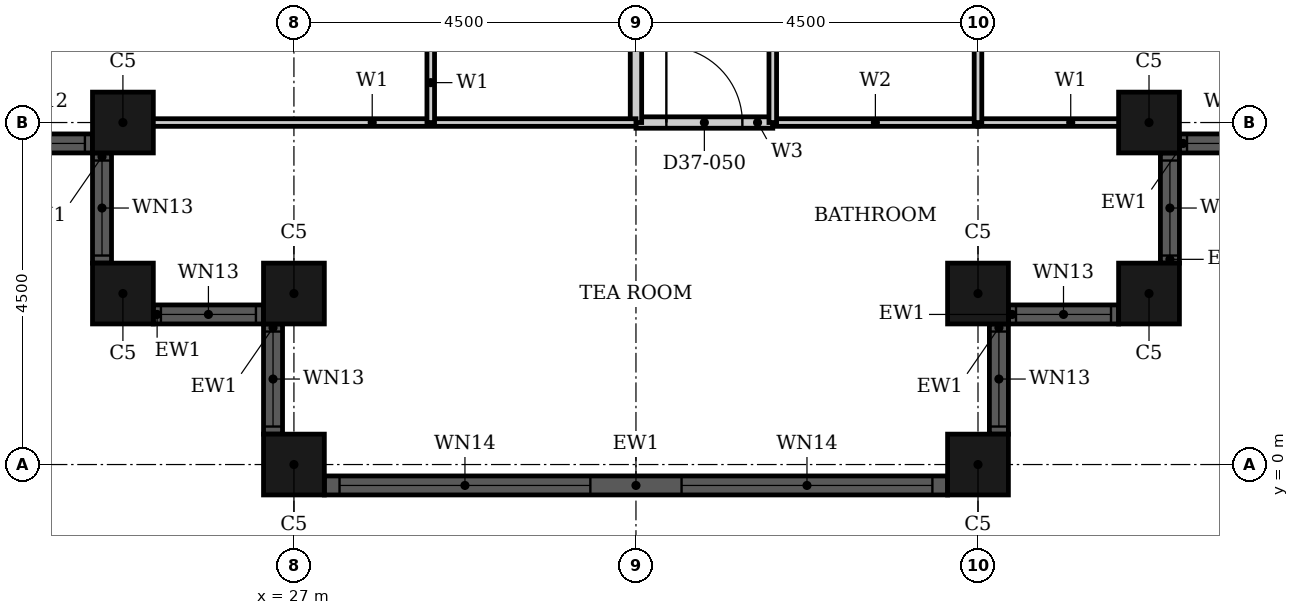
"""IFC4 building model, lengths in metres.
Left out: names, types, materials, properties, quantities, classifications, styles, units other than length and angle.
Written with IfcOpenShell. Run it as: python <this file> out.ifc"""

import sys

from ifc_helpers import new_model, si_unit, direction, frame, frame_2d, origin, origin_2d, place, context, subcontext, project, spatial, rectangle, hollow_rectangle, extrude, element, fill, save


model = new_model("IFC4")
c1 = context("Model", 3, precision=1e-05, world=origin(), true_north=direction((0.0, 1.0)))
c2 = subcontext(c1, "Body", "Model", "MODEL_VIEW")
j1 = project(units=[si_unit("LENGTHUNIT", "METRE"), si_unit("PLANEANGLEUNIT", "RADIAN")], contexts=[c1])
p1 = place(None, origin())
s1 = spatial("IfcSite", under=j1, at=p1, CompositionType="ELEMENT")
p2 = place(p1, origin())
s2 = spatial("IfcBuilding", under=s1, at=p2, CompositionType="ELEMENT")
p3 = place(p2, frame((0.0, 0.0, 150.6)))
s3 = spatial("IfcBuildingStorey", under=s2, at=p3, CompositionType="ELEMENT", Elevation=150.6)
for number, where, z_axis, x_axis in (
    (1, (24.75, 4.5, 0.0), (0.0, 0.0, 1.0), (1.0, 0.0, 0.0)),
    (2, (24.75, 2.25, 0.0), (0.0, 0.0, 1.0), (1.0, 0.0, 0.0)),
    (3, (27.0, 2.25, 0.0), (0.0, 0.0, 1.0), (1.0, 0.0, 0.0)),
    (4, (27.0, 0.0, 0.0), (0.0, 0.0, 1.0), (1.0, 0.0, 0.0)),
    (5, (36.0, 0.0, 0.0), (0.0, 0.0, 1.0), (1.0, 0.0, 0.0)),
    (6, (36.0, 2.25, 0.0), (0.0, 0.0, 1.0), (1.0, 0.0, 0.0)),
    (7, (38.25, 2.25, 0.0), (0.0, 0.0, 1.0), (1.0, 0.0, 0.0)),
    (8, (38.25, 4.5, 0.0), (0.0, 0.0, 1.0), (1.0, 0.0, 0.0)),
):
    element("IfcColumn", number, at=place(p3, frame(where, z_axis=z_axis, x_axis=x_axis)), inside=s3, PredefinedType="COLUMN", context=c2, shape_type="SweptSolid", body=[
        extrude(hollow_rectangle(XDim=0.8, YDim=0.8, WallThickness=0.025, at=origin_2d()), origin(), (0.0, 0.0, 1.0), 3.7),
    ])
p4 = place(p3, frame((22.9, 4.225, 0.0), z_axis=(0.0, 0.0, 1.0), x_axis=(1.0, 0.0, 0.0)))
e9 = element("IfcWall", 9, at=p4, inside=s3, PredefinedType="SOLIDWALL", context=c2, shape_type="SweptSolid", body=[
    extrude(rectangle(XDim=1.45, YDim=0.25, at=frame_2d((0.725, 0.0))), origin(), (0.0, 0.0, 1.0), 3.7),
])
p5 = place(p4, frame((0.1, 0.0, 0.9)))
e10 = element("IfcOpeningElement", 10, at=p5, cuts=e9, PredefinedType="OPENING", context=c2, shape_type="SweptSolid", body=[
    extrude(rectangle(XDim=1.25, YDim=2.08, at=frame_2d((0.625, 1.04))), frame((0.0, 0.135, 0.0), z_axis=(0.0, -1.0, 0.0), x_axis=(1.0, 0.0, 0.0)), (0.0, 0.0, 1.0), 0.27),
])
p6 = place(p3, frame((24.475, 4.1, 0.0), z_axis=(0.0, 0.0, 1.0), x_axis=(0.0, -1.0, 0.0)))
e11 = element("IfcWall", 11, at=p6, inside=s3, PredefinedType="SOLIDWALL", context=c2, shape_type="SweptSolid", body=[
    extrude(rectangle(XDim=1.45, YDim=0.25, at=frame_2d((0.725, 0.0))), origin(), (0.0, 0.0, 1.0), 3.7),
])
p7 = place(p6, frame((0.1, 0.0, 0.9)))
e12 = element("IfcOpeningElement", 12, at=p7, cuts=e11, PredefinedType="OPENING", context=c2, shape_type="SweptSolid", body=[
    extrude(rectangle(XDim=1.25, YDim=1.85, at=frame_2d((0.625, 0.925))), frame((0.0, 0.135, 0.0), z_axis=(0.0, -1.0, 0.0), x_axis=(1.0, 0.0, 0.0)), (0.0, 0.0, 1.0), 0.27),
])
p8 = place(p3, frame((25.15, 1.975, 0.0), z_axis=(0.0, 0.0, 1.0), x_axis=(1.0, 0.0, 0.0)))
e13 = element("IfcWall", 13, at=p8, inside=s3, PredefinedType="SOLIDWALL", context=c2, shape_type="SweptSolid", body=[
    extrude(rectangle(XDim=1.45, YDim=0.25, at=frame_2d((0.725, 0.0))), origin(), (0.0, 0.0, 1.0), 3.7),
])
p9 = place(p8, frame((0.1, 0.0, 0.9)))
e14 = element("IfcOpeningElement", 14, at=p9, cuts=e13, PredefinedType="OPENING", context=c2, shape_type="SweptSolid", body=[
    extrude(rectangle(XDim=1.25, YDim=1.85, at=frame_2d((0.625, 0.925))), frame((0.0, 0.135, 0.0), z_axis=(0.0, -1.0, 0.0), x_axis=(1.0, 0.0, 0.0)), (0.0, 0.0, 1.0), 0.27),
])
p10 = place(p3, frame((26.725, 1.85, 0.0), z_axis=(0.0, 0.0, 1.0), x_axis=(0.0, -1.0, 0.0)))
e15 = element("IfcWall", 15, at=p10, inside=s3, PredefinedType="SOLIDWALL", context=c2, shape_type="SweptSolid", body=[
    extrude(rectangle(XDim=1.45, YDim=0.25, at=frame_2d((0.725, 0.0))), origin(), (0.0, 0.0, 1.0), 3.7),
])
p11 = place(p10, frame((0.1, 0.0, 0.9)))
e16 = element("IfcOpeningElement", 16, at=p11, cuts=e15, PredefinedType="OPENING", context=c2, shape_type="SweptSolid", body=[
    extrude(rectangle(XDim=1.25, YDim=1.85, at=frame_2d((0.625, 0.925))), frame((0.0, 0.135, 0.0), z_axis=(0.0, -1.0, 0.0), x_axis=(1.0, 0.0, 0.0)), (0.0, 0.0, 1.0), 0.27),
])
p12 = place(p3, frame((27.4, -0.275, 0.0), z_axis=(0.0, 0.0, 1.0), x_axis=(1.0, 0.0, 0.0)))
e17 = element("IfcWall", 17, at=p12, inside=s3, PredefinedType="SOLIDWALL", context=c2, shape_type="SweptSolid", body=[
    extrude(rectangle(XDim=8.2, YDim=0.25, at=frame_2d((4.1, 0.0))), origin(), (0.0, 0.0, 1.0), 3.7),
])
p13 = place(p12, frame((0.2, 0.0, 0.45)))
e18 = element("IfcOpeningElement", 18, at=p13, cuts=e17, PredefinedType="OPENING", context=c2, shape_type="SweptSolid", body=[
    extrude(rectangle(XDim=3.3, YDim=2.53, at=frame_2d((1.65, 1.265))), frame((0.0, 0.135, 0.0), z_axis=(0.0, -1.0, 0.0), x_axis=(1.0, 0.0, 0.0)), (0.0, 0.0, 1.0), 0.27),
])
p14 = place(p12, frame((4.7, 0.0, 0.45)))
e19 = element("IfcOpeningElement", 19, at=p14, cuts=e17, PredefinedType="OPENING", context=c2, shape_type="SweptSolid", body=[
    extrude(rectangle(XDim=3.3, YDim=2.53, at=frame_2d((1.65, 1.265))), frame((0.0, 0.135, 0.0), z_axis=(0.0, -1.0, 0.0), x_axis=(1.0, 0.0, 0.0)), (0.0, 0.0, 1.0), 0.27),
])
p15 = place(p3, frame((36.275, 0.4, 0.0), z_axis=(0.0, 0.0, 1.0), x_axis=(0.0, 1.0, 0.0)))
e20 = element("IfcWall", 20, at=p15, inside=s3, PredefinedType="SOLIDWALL", context=c2, shape_type="SweptSolid", body=[
    extrude(rectangle(XDim=1.45, YDim=0.25, at=frame_2d((0.725, 0.0))), origin(), (0.0, 0.0, 1.0), 3.7),
])
p16 = place(p15, frame((0.1, 0.0, 0.9)))
e21 = element("IfcOpeningElement", 21, at=p16, cuts=e20, PredefinedType="OPENING", context=c2, shape_type="SweptSolid", body=[
    extrude(rectangle(XDim=1.25, YDim=1.85, at=frame_2d((0.625, 0.925))), frame((0.0, 0.135, 0.0), z_axis=(0.0, -1.0, 0.0), x_axis=(1.0, 0.0, 0.0)), (0.0, 0.0, 1.0), 0.27),
])
p17 = place(p3, frame((36.4, 1.975, 0.0), z_axis=(0.0, 0.0, 1.0), x_axis=(1.0, 0.0, 0.0)))
e22 = element("IfcWall", 22, at=p17, inside=s3, PredefinedType="SOLIDWALL", context=c2, shape_type="SweptSolid", body=[
    extrude(rectangle(XDim=1.45, YDim=0.25, at=frame_2d((0.725, 0.0))), origin(), (0.0, 0.0, 1.0), 3.7),
])
p18 = place(p17, frame((0.1, 0.0, 0.9)))
e23 = element("IfcOpeningElement", 23, at=p18, cuts=e22, PredefinedType="OPENING", context=c2, shape_type="SweptSolid", body=[
    extrude(rectangle(XDim=1.25, YDim=1.85, at=frame_2d((0.625, 0.925))), frame((0.0, 0.135, 0.0), z_axis=(0.0, -1.0, 0.0), x_axis=(1.0, 0.0, 0.0)), (0.0, 0.0, 1.0), 0.27),
])
p19 = place(p3, frame((38.525, 2.65, 0.0), z_axis=(0.0, 0.0, 1.0), x_axis=(0.0, 1.0, 0.0)))
e24 = element("IfcWall", 24, at=p19, inside=s3, PredefinedType="SOLIDWALL", context=c2, shape_type="SweptSolid", body=[
    extrude(rectangle(XDim=1.45, YDim=0.25, at=frame_2d((0.725, 0.0))), origin(), (0.0, 0.0, 1.0), 3.7),
])
p20 = place(p19, frame((0.1, 0.0, 0.9)))
e25 = element("IfcOpeningElement", 25, at=p20, cuts=e24, PredefinedType="OPENING", context=c2, shape_type="SweptSolid", body=[
    extrude(rectangle(XDim=1.25, YDim=1.85, at=frame_2d((0.625, 0.925))), frame((0.0, 0.135, 0.0), z_axis=(0.0, -1.0, 0.0), x_axis=(1.0, 0.0, 0.0)), (0.0, 0.0, 1.0), 0.27),
])
p21 = place(p3, frame((38.65, 4.225, 0.0), z_axis=(0.0, 0.0, 1.0), x_axis=(1.0, 0.0, 0.0)))
e26 = element("IfcWall", 26, at=p21, inside=s3, PredefinedType="SOLIDWALL", context=c2, shape_type="SweptSolid", body=[
    extrude(rectangle(XDim=1.45, YDim=0.25, at=frame_2d((0.725, 0.0))), origin(), (0.0, 0.0, 1.0), 3.7),
])
p22 = place(p21, frame((0.1, 0.0, 0.9)))
e27 = element("IfcOpeningElement", 27, at=p22, cuts=e26, PredefinedType="OPENING", context=c2, shape_type="SweptSolid", body=[
    extrude(rectangle(XDim=1.25, YDim=2.08, at=frame_2d((0.625, 1.04))), frame((0.0, 0.135, 0.0), z_axis=(0.0, -1.0, 0.0), x_axis=(1.0, 0.0, 0.0)), (0.0, 0.0, 1.0), 0.27),
])
p23 = place(p3, frame((31.5, 4.5, 0.0), z_axis=(0.0, 0.0, 1.0), x_axis=(1.0, 0.0, 0.0)))
e28 = element("IfcWall", 28, at=p23, inside=s3, PredefinedType="PARTITIONING", context=c2, shape_type="SweptSolid", body=[
    extrude(rectangle(XDim=1.8, YDim=0.15, at=frame_2d((0.9, 0.0))), origin(), (0.0, 0.0, 1.0), 3.4),
])
p24 = place(p23, frame((0.4, 0.0, 0.0)))
e29 = element("IfcOpeningElement", 29, at=p24, cuts=e28, PredefinedType="OPENING", context=c2, shape_type="SweptSolid", body=[
    extrude(rectangle(XDim=1.0, YDim=2.1, at=frame_2d((0.5, 1.05))), frame((0.0, 0.085, 0.0), z_axis=(0.0, -1.0, 0.0), x_axis=(1.0, 0.0, 0.0)), (0.0, 0.0, 1.0), 0.17),
])
p25 = place(p3, frame((31.5, 4.5, 0.0), z_axis=(0.0, 0.0, 1.0), x_axis=(0.0, 1.0, 0.0)))
e30 = element("IfcWall", 30, at=p25, inside=s3, PredefinedType="PARTITIONING", context=c2, shape_type="SweptSolid", body=[
    extrude(rectangle(XDim=6.6, YDim=0.15, at=frame_2d((3.3, 0.0))), origin(), (0.0, 0.0, 1.0), 2.68),
])
p26 = place(p25, frame((4.3, 0.0, 0.0)))
e31 = element("IfcOpeningElement", 31, at=p26, cuts=e30, PredefinedType="OPENING", context=c2, shape_type="SweptSolid", body=[
    extrude(rectangle(XDim=1.0, YDim=2.2, at=frame_2d((0.5, 1.1))), frame((0.0, 0.085, 0.0), z_axis=(0.0, -1.0, 0.0), x_axis=(1.0, 0.0, 0.0)), (0.0, 0.0, 1.0), 0.17),
])
p27 = place(p3, frame((36.0, 4.5, 0.0), z_axis=(0.0, 0.0, 1.0), x_axis=(1.0, 0.0, 0.0)))
e32 = element("IfcWall", 32, at=p27, inside=s3, PredefinedType="PARTITIONING", context=c2, shape_type="SweptSolid", body=[
    extrude(rectangle(XDim=2.44, YDim=0.1, at=frame_2d((1.22, 0.0))), origin(), (0.0, 0.0, 1.0), 3.4),
])
p28 = place(p3, frame((24.56, 4.5, 0.0), z_axis=(0.0, 0.0, 1.0), x_axis=(1.0, 0.0, 0.0)))
e33 = element("IfcWall", 33, at=p28, inside=s3, PredefinedType="PARTITIONING", context=c2, shape_type="SweptSolid", body=[
    extrude(rectangle(XDim=6.94, YDim=0.1, at=frame_2d((3.47, 0.0))), origin(), (0.0, 0.0, 1.0), 3.4),
])
p29 = place(p3, frame((28.8, 4.5, 0.0), z_axis=(0.0, 0.0, 1.0), x_axis=(0.0, 1.0, 0.0)))
e34 = element("IfcWall", 34, at=p29, inside=s3, PredefinedType="PARTITIONING", context=c2, shape_type="SweptSolid", body=[
    extrude(rectangle(XDim=3.0, YDim=0.1, at=frame_2d((1.5, 0.0))), origin(), (0.0, 0.0, 1.0), 3.4),
])
p30 = place(p29, frame((1.05, 0.0, 0.0)))
e35 = element("IfcOpeningElement", 35, at=p30, cuts=e34, PredefinedType="OPENING", context=c2, shape_type="SweptSolid", body=[
    extrude(rectangle(XDim=0.9, YDim=2.1, at=frame_2d((0.45, 1.05))), frame((0.0, 0.06, 0.0), z_axis=(0.0, -1.0, 0.0), x_axis=(1.0, 0.0, 0.0)), (0.0, 0.0, 1.0), 0.12),
])
p31 = place(p3, frame((33.3, 4.5, 0.0), z_axis=(0.0, 0.0, 1.0), x_axis=(1.0, 0.0, 0.0)))
e36 = element("IfcWall", 36, at=p31, inside=s3, PredefinedType="PARTITIONING", context=c2, shape_type="SweptSolid", body=[
    extrude(rectangle(XDim=2.7, YDim=0.1, at=frame_2d((1.35, 0.0))), origin(), (0.0, 0.0, 1.0), 3.4),
])
p32 = place(p3, frame((33.3, 4.5, 0.0), z_axis=(0.0, 0.0, 1.0), x_axis=(0.0, 1.0, 0.0)))
e37 = element("IfcWall", 37, at=p32, inside=s3, PredefinedType="PARTITIONING", context=c2, shape_type="SweptSolid", body=[
    extrude(rectangle(XDim=2.4, YDim=0.1, at=frame_2d((1.2, 0.0))), origin(), (0.0, 0.0, 1.0), 3.4),
])
p33 = place(p3, frame((36.0, 4.5, 0.0), z_axis=(0.0, 0.0, 1.0), x_axis=(0.0, 1.0, 0.0)))
e38 = element("IfcWall", 38, at=p33, inside=s3, PredefinedType="PARTITIONING", context=c2, shape_type="SweptSolid", body=[
    extrude(rectangle(XDim=2.4, YDim=0.1, at=frame_2d((1.2, 0.0))), origin(), (0.0, 0.0, 1.0), 2.68),
])
p34 = place(p5, origin())
e39 = element("IfcWindow", 39, at=p34, inside=s3, PartitioningType="SINGLE_PANEL", PredefinedType="WINDOW", context=c2, shape_type="SweptSolid", body=[
    extrude(rectangle(XDim=1.25, YDim=2.08, at=frame_2d((0.625, 1.04))), frame((0.0, 0.03, 0.0), z_axis=(0.0, -1.0, 0.0), x_axis=(1.0, 0.0, 0.0)), (0.0, 0.0, 1.0), 0.06),
])
fill(e10, e39)
p35 = place(p7, origin())
e40 = element("IfcWindow", 40, at=p35, inside=s3, PartitioningType="SINGLE_PANEL", PredefinedType="WINDOW", context=c2, shape_type="SweptSolid", body=[
    extrude(rectangle(XDim=1.25, YDim=1.85, at=frame_2d((0.625, 0.925))), frame((0.0, 0.03, 0.0), z_axis=(0.0, -1.0, 0.0), x_axis=(1.0, 0.0, 0.0)), (0.0, 0.0, 1.0), 0.06),
])
fill(e12, e40)
p36 = place(p9, origin())
e41 = element("IfcWindow", 41, at=p36, inside=s3, PartitioningType="SINGLE_PANEL", PredefinedType="WINDOW", context=c2, shape_type="SweptSolid", body=[
    extrude(rectangle(XDim=1.25, YDim=1.85, at=frame_2d((0.625, 0.925))), frame((0.0, 0.03, 0.0), z_axis=(0.0, -1.0, 0.0), x_axis=(1.0, 0.0, 0.0)), (0.0, 0.0, 1.0), 0.06),
])
fill(e14, e41)
p37 = place(p11, origin())
e42 = element("IfcWindow", 42, at=p37, inside=s3, PartitioningType="SINGLE_PANEL", PredefinedType="WINDOW", context=c2, shape_type="SweptSolid", body=[
    extrude(rectangle(XDim=1.25, YDim=1.85, at=frame_2d((0.625, 0.925))), frame((0.0, 0.03, 0.0), z_axis=(0.0, -1.0, 0.0), x_axis=(1.0, 0.0, 0.0)), (0.0, 0.0, 1.0), 0.06),
])
fill(e16, e42)
p38 = place(p13, origin())
e43 = element("IfcWindow", 43, at=p38, inside=s3, PartitioningType="SINGLE_PANEL", PredefinedType="WINDOW", context=c2, shape_type="SweptSolid", body=[
    extrude(rectangle(XDim=3.3, YDim=2.53, at=frame_2d((1.65, 1.265))), frame((0.0, 0.03, 0.0), z_axis=(0.0, -1.0, 0.0), x_axis=(1.0, 0.0, 0.0)), (0.0, 0.0, 1.0), 0.06),
])
fill(e18, e43)
p39 = place(p14, origin())
e44 = element("IfcWindow", 44, at=p39, inside=s3, PartitioningType="SINGLE_PANEL", PredefinedType="WINDOW", context=c2, shape_type="SweptSolid", body=[
    extrude(rectangle(XDim=3.3, YDim=2.53, at=frame_2d((1.65, 1.265))), frame((0.0, 0.03, 0.0), z_axis=(0.0, -1.0, 0.0), x_axis=(1.0, 0.0, 0.0)), (0.0, 0.0, 1.0), 0.06),
])
fill(e19, e44)
p40 = place(p16, origin())
e45 = element("IfcWindow", 45, at=p40, inside=s3, PartitioningType="SINGLE_PANEL", PredefinedType="WINDOW", context=c2, shape_type="SweptSolid", body=[
    extrude(rectangle(XDim=1.25, YDim=1.85, at=frame_2d((0.625, 0.925))), frame((0.0, 0.03, 0.0), z_axis=(0.0, -1.0, 0.0), x_axis=(1.0, 0.0, 0.0)), (0.0, 0.0, 1.0), 0.06),
])
fill(e21, e45)
p41 = place(p18, origin())
e46 = element("IfcWindow", 46, at=p41, inside=s3, PartitioningType="SINGLE_PANEL", PredefinedType="WINDOW", context=c2, shape_type="SweptSolid", body=[
    extrude(rectangle(XDim=1.25, YDim=1.85, at=frame_2d((0.625, 0.925))), frame((0.0, 0.03, 0.0), z_axis=(0.0, -1.0, 0.0), x_axis=(1.0, 0.0, 0.0)), (0.0, 0.0, 1.0), 0.06),
])
fill(e23, e46)
p42 = place(p20, origin())
e47 = element("IfcWindow", 47, at=p42, inside=s3, PartitioningType="SINGLE_PANEL", PredefinedType="WINDOW", context=c2, shape_type="SweptSolid", body=[
    extrude(rectangle(XDim=1.25, YDim=1.85, at=frame_2d((0.625, 0.925))), frame((0.0, 0.03, 0.0), z_axis=(0.0, -1.0, 0.0), x_axis=(1.0, 0.0, 0.0)), (0.0, 0.0, 1.0), 0.06),
])
fill(e25, e47)
p43 = place(p22, origin())
e48 = element("IfcWindow", 48, at=p43, inside=s3, PartitioningType="SINGLE_PANEL", PredefinedType="WINDOW", context=c2, shape_type="SweptSolid", body=[
    extrude(rectangle(XDim=1.25, YDim=2.08, at=frame_2d((0.625, 1.04))), frame((0.0, 0.03, 0.0), z_axis=(0.0, -1.0, 0.0), x_axis=(1.0, 0.0, 0.0)), (0.0, 0.0, 1.0), 0.06),
])
fill(e27, e48)
p44 = place(p24, origin())
e49 = element("IfcDoor", 49, at=p44, inside=s3, OperationType="SINGLE_SWING_LEFT", PredefinedType="DOOR", context=c2, shape_type="SweptSolid", body=[
    extrude(rectangle(XDim=1.0, YDim=2.1, at=frame_2d((0.5, 1.05))), frame((0.0, 0.025, 0.0), z_axis=(0.0, -1.0, 0.0), x_axis=(1.0, 0.0, 0.0)), (0.0, 0.0, 1.0), 0.05),
])
fill(e29, e49)
save(model, sys.argv[1])
